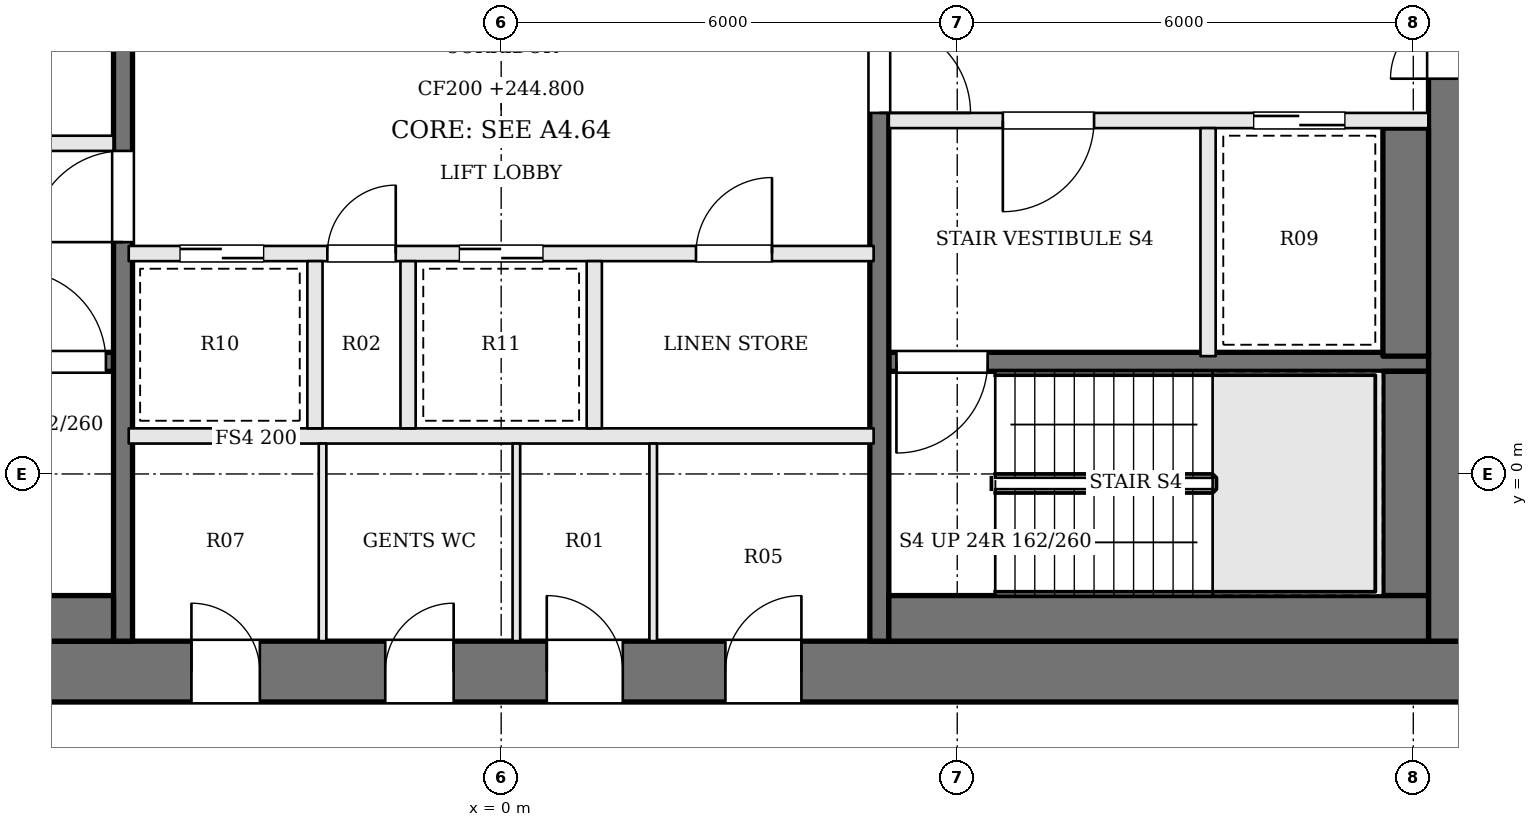
"""IFC4 building model, lengths in metres.
Left out: names, types, materials, properties, quantities, classifications, styles, units other than length and angle.
Written with IfcOpenShell. Run it as: python <this file> out.ifc"""

import sys

from ifc_helpers import new_model, si_unit, direction, frame, frame_2d, origin, place, context, subcontext, project, spatial, rectangle, extrude, element, fill, save


model = new_model("IFC4")
c1 = context("Model", 3, precision=1e-05, world=origin(), true_north=direction((0.0, 1.0)))
c2 = subcontext(c1, "Body", "Model", "MODEL_VIEW")
j1 = project(units=[si_unit("LENGTHUNIT", "METRE"), si_unit("PLANEANGLEUNIT", "RADIAN")], contexts=[c1])
p1 = place(None, origin())
s1 = spatial("IfcSite", under=j1, at=p1, CompositionType="ELEMENT")
p2 = place(p1, origin())
s2 = spatial("IfcBuilding", under=s1, at=p2, CompositionType="ELEMENT")
p3 = place(p2, frame((0.0, 0.0, 244.8)))
s3 = spatial("IfcBuildingStorey", under=s2, at=p3, CompositionType="ELEMENT", Elevation=244.8)
p4 = place(p3, frame((-13.0, -2.6, 0.0), z_axis=(0.0, 0.0, 1.0), x_axis=(1.0, 0.0, 0.0)))
e1 = element("IfcWall", 1, at=p4, inside=s3, PredefinedType="SHEAR", context=c2, shape_type="SweptSolid", body=[
    extrude(rectangle(XDim=26.0, YDim=0.8, at=frame_2d((13.0, 0.0))), origin(), (0.0, 0.0, 1.0), 3.9),
])
p5 = place(p4, frame((8.925, 0.0, 0.0)))
e2 = element("IfcOpeningElement", 2, at=p5, cuts=e1, PredefinedType="OPENING", context=c2, shape_type="SweptSolid", body=[
    extrude(rectangle(XDim=0.9, YDim=2.1, at=frame_2d((0.45, 1.05))), frame((0.0, 0.41, 0.0), z_axis=(0.0, -1.0, 0.0), x_axis=(1.0, 0.0, 0.0)), (0.0, 0.0, 1.0), 0.82),
])
p6 = place(p4, frame((11.475, 0.0, 0.0)))
e3 = element("IfcOpeningElement", 3, at=p6, cuts=e1, PredefinedType="OPENING", context=c2, shape_type="SweptSolid", body=[
    extrude(rectangle(XDim=0.9, YDim=2.1, at=frame_2d((0.45, 1.05))), frame((0.0, 0.41, 0.0), z_axis=(0.0, -1.0, 0.0), x_axis=(1.0, 0.0, 0.0)), (0.0, 0.0, 1.0), 0.82),
])
p7 = place(p4, frame((13.6, 0.0, 0.0)))
e4 = element("IfcOpeningElement", 4, at=p7, cuts=e1, PredefinedType="OPENING", context=c2, shape_type="SweptSolid", body=[
    extrude(rectangle(XDim=1.0, YDim=2.1, at=frame_2d((0.5, 1.05))), frame((0.0, 0.41, 0.0), z_axis=(0.0, -1.0, 0.0), x_axis=(1.0, 0.0, 0.0)), (0.0, 0.0, 1.0), 0.82),
])
p8 = place(p4, frame((15.95, 0.0, 0.0)))
e5 = element("IfcOpeningElement", 5, at=p8, cuts=e1, PredefinedType="OPENING", context=c2, shape_type="SweptSolid", body=[
    extrude(rectangle(XDim=1.0, YDim=2.1, at=frame_2d((0.5, 1.05))), frame((0.0, 0.41, 0.0), z_axis=(0.0, -1.0, 0.0), x_axis=(1.0, 0.0, 0.0)), (0.0, 0.0, 1.0), 0.82),
])
p9 = place(p3, frame((12.6, -2.2, 0.0), z_axis=(0.0, 0.0, 1.0), x_axis=(0.0, 1.0, 0.0)))
e6 = element("IfcWall", 6, at=p9, inside=s3, PredefinedType="SHEAR", context=c2, shape_type="SweptSolid", body=[
    extrude(rectangle(XDim=13.4, YDim=0.8, at=frame_2d((6.7, 0.0))), origin(), (0.0, 0.0, 1.0), 3.9),
])
p10 = place(p9, frame((7.4, 0.0, 0.0)))
e7 = element("IfcOpeningElement", 7, at=p10, cuts=e6, PredefinedType="OPENING", context=c2, shape_type="SweptSolid", body=[
    extrude(rectangle(XDim=1.8, YDim=2.1, at=frame_2d((0.9, 1.05))), frame((0.0, 0.41, 0.0), z_axis=(0.0, -1.0, 0.0), x_axis=(1.0, 0.0, 0.0)), (0.0, 0.0, 1.0), 0.82),
])
p11 = place(p3, frame((-12.2, 1.475, 0.0), z_axis=(0.0, 0.0, 1.0), x_axis=(1.0, 0.0, 0.0)))
e8 = element("IfcWall", 8, at=p11, inside=s3, PredefinedType="SOLIDWALL", context=c2, shape_type="SweptSolid", body=[
    extrude(rectangle(XDim=7.1, YDim=0.25, at=frame_2d((3.55, 0.0))), origin(), (0.0, 0.0, 1.0), 3.7),
])
p12 = place(p11, frame((5.8, 0.0, 0.0)))
e9 = element("IfcOpeningElement", 9, at=p12, cuts=e8, PredefinedType="OPENING", context=c2, shape_type="SweptSolid", body=[
    extrude(rectangle(XDim=1.2, YDim=2.1, at=frame_2d((0.6, 1.05))), frame((0.0, 0.135, 0.0), z_axis=(0.0, -1.0, 0.0), x_axis=(1.0, 0.0, 0.0)), (0.0, 0.0, 1.0), 0.27),
])
p13 = place(p3, frame((-12.2, 4.35, 0.0), z_axis=(0.0, 0.0, 1.0), x_axis=(1.0, 0.0, 0.0)))
e10 = element("IfcWall", 10, at=p13, inside=s3, PredefinedType="SOLIDWALL", context=c2, shape_type="SweptSolid", body=[
    extrude(rectangle(XDim=7.1, YDim=0.2, at=frame_2d((3.55, 0.0))), origin(), (0.0, 0.0, 1.0), 3.7),
])
p14 = place(p13, frame((4.4, 0.0, 0.0)))
e11 = element("IfcOpeningElement", 11, at=p14, cuts=e10, PredefinedType="OPENING", context=c2, shape_type="SweptSolid", body=[
    extrude(rectangle(XDim=1.2, YDim=2.1, at=frame_2d((0.6, 1.05))), frame((0.0, 0.11, 0.0), z_axis=(0.0, -1.0, 0.0), x_axis=(1.0, 0.0, 0.0)), (0.0, 0.0, 1.0), 0.22),
])
p15 = place(p13, frame((1.1, 0.0, 0.0)))
e12 = element("IfcOpeningElement", 12, at=p15, cuts=e10, PredefinedType="OPENING", context=c2, shape_type="SweptSolid", body=[
    extrude(rectangle(XDim=1.2, YDim=2.1, at=frame_2d((0.6, 1.05))), frame((0.0, 0.11, 0.0), z_axis=(0.0, -1.0, 0.0), x_axis=(1.0, 0.0, 0.0)), (0.0, 0.0, 1.0), 0.22),
])
p16 = place(p3, frame((12.2, 4.65, 0.0), z_axis=(0.0, 0.0, 1.0), x_axis=(-1.0, 0.0, 0.0)))
e13 = element("IfcWall", 13, at=p16, inside=s3, PredefinedType="SOLIDWALL", context=c2, shape_type="SweptSolid", body=[
    extrude(rectangle(XDim=7.1, YDim=0.2, at=frame_2d((3.55, 0.0))), origin(), (0.0, 0.0, 1.0), 3.7),
])
p17 = place(p16, frame((4.4, 0.0, 0.0)))
e14 = element("IfcOpeningElement", 14, at=p17, cuts=e13, PredefinedType="OPENING", context=c2, shape_type="SweptSolid", body=[
    extrude(rectangle(XDim=1.2, YDim=2.1, at=frame_2d((0.6, 1.05))), frame((0.0, 0.11, 0.0), z_axis=(0.0, -1.0, 0.0), x_axis=(1.0, 0.0, 0.0)), (0.0, 0.0, 1.0), 0.22),
])
p18 = place(p16, frame((1.1, 0.0, 0.0)))
e15 = element("IfcOpeningElement", 15, at=p18, cuts=e13, PredefinedType="OPENING", context=c2, shape_type="SweptSolid", body=[
    extrude(rectangle(XDim=1.2, YDim=2.1, at=frame_2d((0.6, 1.05))), frame((0.0, 0.11, 0.0), z_axis=(0.0, -1.0, 0.0), x_axis=(1.0, 0.0, 0.0)), (0.0, 0.0, 1.0), 0.22),
])
p19 = place(p3, frame((12.2, 1.475, 0.0), z_axis=(0.0, 0.0, 1.0), x_axis=(-1.0, 0.0, 0.0)))
e16 = element("IfcWall", 16, at=p19, inside=s3, PredefinedType="SOLIDWALL", context=c2, shape_type="SweptSolid", body=[
    extrude(rectangle(XDim=7.1, YDim=0.25, at=frame_2d((3.55, 0.0))), origin(), (0.0, 0.0, 1.0), 3.7),
])
p20 = place(p19, frame((5.8, 0.0, 0.0)))
e17 = element("IfcOpeningElement", 17, at=p20, cuts=e16, PredefinedType="OPENING", context=c2, shape_type="SweptSolid", body=[
    extrude(rectangle(XDim=1.2, YDim=2.1, at=frame_2d((0.6, 1.05))), frame((0.0, 0.135, 0.0), z_axis=(0.0, -1.0, 0.0), x_axis=(1.0, 0.0, 0.0)), (0.0, 0.0, 1.0), 0.27),
])
p21 = place(p3, frame((9.3, 4.55, 0.0), z_axis=(0.0, 0.0, 1.0), x_axis=(0.0, -1.0, 0.0)))
e18 = element("IfcWall", 18, at=p21, inside=s3, PredefinedType="SOLIDWALL", context=c2, shape_type="SweptSolid", body=[
    extrude(rectangle(XDim=3.0, YDim=0.2, at=frame_2d((1.5, 0.0))), origin(), (0.0, 0.0, 1.0), 3.7),
])
p22 = place(p3, frame((-4.975, -2.2, 0.0), z_axis=(0.0, 0.0, 1.0), x_axis=(0.0, 1.0, 0.0)))
e19 = element("IfcWall", 19, at=p22, inside=s3, PredefinedType="SOLIDWALL", context=c2, shape_type="SweptSolid", body=[
    extrude(rectangle(XDim=13.4, YDim=0.25, at=frame_2d((6.7, 0.0))), origin(), (0.0, 0.0, 1.0), 3.7),
])
p23 = place(p22, frame((5.25, 0.0, 0.0)))
e20 = element("IfcOpeningElement", 20, at=p23, cuts=e19, PredefinedType="OPENING", context=c2, shape_type="SweptSolid", body=[
    extrude(rectangle(XDim=1.2, YDim=2.1, at=frame_2d((0.6, 1.05))), frame((0.0, 0.135, 0.0), z_axis=(0.0, -1.0, 0.0), x_axis=(1.0, 0.0, 0.0)), (0.0, 0.0, 1.0), 0.27),
])
p24 = place(p3, frame((4.975, 11.2, 0.0), z_axis=(0.0, 0.0, 1.0), x_axis=(0.0, -1.0, 0.0)))
e21 = element("IfcWall", 21, at=p24, inside=s3, PredefinedType="SOLIDWALL", context=c2, shape_type="SweptSolid", body=[
    extrude(rectangle(XDim=13.4, YDim=0.25, at=frame_2d((6.7, 0.0))), origin(), (0.0, 0.0, 1.0), 3.7),
])
p25 = place(p24, frame((5.25, 0.0, 0.0)))
e22 = element("IfcOpeningElement", 22, at=p25, cuts=e21, PredefinedType="OPENING", context=c2, shape_type="SweptSolid", body=[
    extrude(rectangle(XDim=1.2, YDim=2.1, at=frame_2d((0.6, 1.05))), frame((0.0, 0.135, 0.0), z_axis=(0.0, -1.0, 0.0), x_axis=(1.0, 0.0, 0.0)), (0.0, 0.0, 1.0), 0.27),
])
p26 = place(p3, frame((-12.2, -1.9, 0.0), z_axis=(0.0, 0.0, 1.0), x_axis=(1.0, 0.0, 0.0)))
e23 = element("IfcWall", 23, at=p26, inside=s3, PredefinedType="SOLIDWALL", context=c2, shape_type="SweptSolid", body=[
    extrude(rectangle(XDim=7.1, YDim=0.6, at=frame_2d((3.55, 0.0))), origin(), (0.0, 0.0, 1.0), 3.7),
])
p27 = place(p3, frame((11.9, 4.55, 0.0), z_axis=(0.0, 0.0, 1.0), x_axis=(0.0, -1.0, 0.0)))
e24 = element("IfcWall", 24, at=p27, inside=s3, PredefinedType="SOLIDWALL", context=c2, shape_type="SweptSolid", body=[
    extrude(rectangle(XDim=3.0, YDim=0.6, at=frame_2d((1.5, 0.0))), origin(), (0.0, 0.0, 1.0), 3.7),
])
p28 = place(p3, frame((11.9, 1.35, 0.0), z_axis=(0.0, 0.0, 1.0), x_axis=(0.0, -1.0, 0.0)))
e25 = element("IfcWall", 25, at=p28, inside=s3, PredefinedType="SOLIDWALL", context=c2, shape_type="SweptSolid", body=[
    extrude(rectangle(XDim=2.95, YDim=0.6, at=frame_2d((1.475, 0.0))), origin(), (0.0, 0.0, 1.0), 3.7),
])
p29 = place(p3, frame((12.2, -1.9, 0.0), z_axis=(0.0, 0.0, 1.0), x_axis=(-1.0, 0.0, 0.0)))
e26 = element("IfcWall", 26, at=p29, inside=s3, PredefinedType="SOLIDWALL", context=c2, shape_type="SweptSolid", body=[
    extrude(rectangle(XDim=7.1, YDim=0.6, at=frame_2d((3.55, 0.0))), origin(), (0.0, 0.0, 1.0), 3.7),
])
p30 = place(p3, frame((-4.9, 0.5, 0.0), z_axis=(0.0, 0.0, 1.0), x_axis=(1.0, 0.0, 0.0)))
e27 = element("IfcWall", 27, at=p30, inside=s3, PredefinedType="SOLIDWALL", context=c2, shape_type="SweptSolid", body=[
    extrude(rectangle(XDim=9.8, YDim=0.2, at=frame_2d((4.9, 0.0))), origin(), (0.0, 0.0, 1.0), 3.7),
])
p31 = place(p3, frame((-4.9, 2.9, 0.0), z_axis=(0.0, 0.0, 1.0), x_axis=(1.0, 0.0, 0.0)))
e28 = element("IfcWall", 28, at=p31, inside=s3, PredefinedType="SOLIDWALL", context=c2, shape_type="SweptSolid", body=[
    extrude(rectangle(XDim=9.8, YDim=0.2, at=frame_2d((4.9, 0.0))), origin(), (0.0, 0.0, 1.0), 3.7),
])
p32 = place(p31, frame((0.675, 0.0, 0.0)))
e29 = element("IfcOpeningElement", 29, at=p32, cuts=e28, PredefinedType="OPENING", context=c2, shape_type="SweptSolid", body=[
    extrude(rectangle(XDim=1.1, YDim=2.1, at=frame_2d((0.55, 1.05))), frame((0.0, 0.11, 0.0), z_axis=(0.0, -1.0, 0.0), x_axis=(1.0, 0.0, 0.0)), (0.0, 0.0, 1.0), 0.22),
])
p33 = place(p31, frame((2.613, 0.0, 0.0)))
e30 = element("IfcOpeningElement", 30, at=p33, cuts=e28, PredefinedType="OPENING", context=c2, shape_type="SweptSolid", body=[
    extrude(rectangle(XDim=0.9, YDim=2.1, at=frame_2d((0.45, 1.05))), frame((0.0, 0.11, 0.0), z_axis=(0.0, -1.0, 0.0), x_axis=(1.0, 0.0, 0.0)), (0.0, 0.0, 1.0), 0.22),
])
p34 = place(p31, frame((4.35, 0.0, 0.0)))
e31 = element("IfcOpeningElement", 31, at=p34, cuts=e28, PredefinedType="OPENING", context=c2, shape_type="SweptSolid", body=[
    extrude(rectangle(XDim=1.1, YDim=2.1, at=frame_2d((0.55, 1.05))), frame((0.0, 0.11, 0.0), z_axis=(0.0, -1.0, 0.0), x_axis=(1.0, 0.0, 0.0)), (0.0, 0.0, 1.0), 0.22),
])
p35 = place(p31, frame((7.463, 0.0, 0.0)))
e32 = element("IfcOpeningElement", 32, at=p35, cuts=e28, PredefinedType="OPENING", context=c2, shape_type="SweptSolid", body=[
    extrude(rectangle(XDim=1.0, YDim=2.1, at=frame_2d((0.5, 1.05))), frame((0.0, 0.11, 0.0), z_axis=(0.0, -1.0, 0.0), x_axis=(1.0, 0.0, 0.0)), (0.0, 0.0, 1.0), 0.22),
])
for number, where, z_axis, x_axis in (
    (33, (-2.45, 0.6, 0.0), (0.0, 0.0, 1.0), (0.0, 1.0, 0.0)),
    (34, (-1.225, 0.6, 0.0), (0.0, 0.0, 1.0), (0.0, 1.0, 0.0)),
    (35, (1.225, 0.6, 0.0), (0.0, 0.0, 1.0), (0.0, 1.0, 0.0)),
):
    element("IfcWall", number, at=place(p3, frame(where, z_axis=z_axis, x_axis=x_axis)), inside=s3, PredefinedType="SOLIDWALL", context=c2, shape_type="SweptSolid", body=[
        extrude(rectangle(XDim=2.2, YDim=0.2, at=frame_2d((1.1, 0.0))), origin(), (0.0, 0.0, 1.0), 3.7),
    ])
for number, where, z_axis, x_axis in (
    (36, (-2.35, -2.2, 0.0), (0.0, 0.0, 1.0), (0.0, 1.0, 0.0)),
    (37, (0.2, -2.2, 0.0), (0.0, 0.0, 1.0), (0.0, 1.0, 0.0)),
    (38, (2.0, -2.2, 0.0), (0.0, 0.0, 1.0), (0.0, 1.0, 0.0)),
):
    element("IfcWall", number, at=place(p3, frame(where, z_axis=z_axis, x_axis=x_axis)), inside=s3, PredefinedType="PARTITIONING", context=c2, shape_type="SweptSolid", body=[
        extrude(rectangle(XDim=2.6, YDim=0.1, at=frame_2d((1.3, 0.0))), origin(), (0.0, 0.0, 1.0), 3.7),
    ])
p36 = place(p10, origin())
e39 = element("IfcDoor", 39, at=p36, inside=s3, OperationType="DOUBLE_DOOR_SINGLE_SWING", PredefinedType="DOOR", context=c2, shape_type="SweptSolid", body=[
    extrude(rectangle(XDim=1.8, YDim=2.1, at=frame_2d((0.9, 1.05))), frame((0.0, 0.025, 0.0), z_axis=(0.0, -1.0, 0.0), x_axis=(1.0, 0.0, 0.0)), (0.0, 0.0, 1.0), 0.05),
])
fill(e7, e39)
p37 = place(p23, origin())
e40 = element("IfcDoor", 40, at=p37, inside=s3, OperationType="SINGLE_SWING_LEFT", PredefinedType="DOOR", context=c2, shape_type="SweptSolid", body=[
    extrude(rectangle(XDim=1.2, YDim=2.1, at=frame_2d((0.6, 1.05))), frame((0.0, 0.025, 0.0), z_axis=(0.0, -1.0, 0.0), x_axis=(1.0, 0.0, 0.0)), (0.0, 0.0, 1.0), 0.05),
])
fill(e20, e40)
p38 = place(p25, origin())
e41 = element("IfcDoor", 41, at=p38, inside=s3, OperationType="SINGLE_SWING_RIGHT", PredefinedType="DOOR", context=c2, shape_type="SweptSolid", body=[
    extrude(rectangle(XDim=1.2, YDim=2.1, at=frame_2d((0.6, 1.05))), frame((0.0, 0.025, 0.0), z_axis=(0.0, -1.0, 0.0), x_axis=(1.0, 0.0, 0.0)), (0.0, 0.0, 1.0), 0.05),
])
fill(e22, e41)
p39 = place(p17, origin())
e42 = element("IfcDoor", 42, at=p39, inside=s3, OperationType="SINGLE_SWING_RIGHT", PredefinedType="DOOR", context=c2, shape_type="SweptSolid", body=[
    extrude(rectangle(XDim=1.2, YDim=2.1, at=frame_2d((0.6, 1.05))), frame((0.0, 0.025, 0.0), z_axis=(0.0, -1.0, 0.0), x_axis=(1.0, 0.0, 0.0)), (0.0, 0.0, 1.0), 0.05),
])
fill(e14, e42)
p40 = place(p12, origin())
e43 = element("IfcDoor", 43, at=p40, inside=s3, OperationType="SINGLE_SWING_LEFT", PredefinedType="DOOR", context=c2, shape_type="SweptSolid", body=[
    extrude(rectangle(XDim=1.2, YDim=2.1, at=frame_2d((0.6, 1.05))), frame((0.0, 0.025, 0.0), z_axis=(0.0, -1.0, 0.0), x_axis=(1.0, 0.0, 0.0)), (0.0, 0.0, 1.0), 0.05),
])
fill(e9, e43)
p41 = place(p20, origin())
e44 = element("IfcDoor", 44, at=p41, inside=s3, OperationType="SINGLE_SWING_RIGHT", PredefinedType="DOOR", context=c2, shape_type="SweptSolid", body=[
    extrude(rectangle(XDim=1.2, YDim=2.1, at=frame_2d((0.6, 1.05))), frame((0.0, 0.025, 0.0), z_axis=(0.0, -1.0, 0.0), x_axis=(1.0, 0.0, 0.0)), (0.0, 0.0, 1.0), 0.05),
])
fill(e17, e44)
p42 = place(p18, origin())
e45 = element("IfcDoor", 45, at=p42, inside=s3, OperationType="SLIDING_TO_RIGHT", PredefinedType="DOOR", context=c2, shape_type="SweptSolid", body=[
    extrude(rectangle(XDim=1.2, YDim=2.1, at=frame_2d((0.6, 1.05))), frame((0.0, 0.025, 0.0), z_axis=(0.0, -1.0, 0.0), x_axis=(1.0, 0.0, 0.0)), (0.0, 0.0, 1.0), 0.05),
])
fill(e15, e45)
p43 = place(p32, origin())
e46 = element("IfcDoor", 46, at=p43, inside=s3, OperationType="SLIDING_TO_RIGHT", PredefinedType="DOOR", context=c2, shape_type="SweptSolid", body=[
    extrude(rectangle(XDim=1.1, YDim=2.1, at=frame_2d((0.55, 1.05))), frame((0.0, 0.025, 0.0), z_axis=(0.0, -1.0, 0.0), x_axis=(1.0, 0.0, 0.0)), (0.0, 0.0, 1.0), 0.05),
])
fill(e29, e46)
p44 = place(p33, origin())
e47 = element("IfcDoor", 47, at=p44, inside=s3, OperationType="SINGLE_SWING_RIGHT", PredefinedType="DOOR", context=c2, shape_type="SweptSolid", body=[
    extrude(rectangle(XDim=0.9, YDim=2.1, at=frame_2d((0.45, 1.05))), frame((0.0, 0.025, 0.0), z_axis=(0.0, -1.0, 0.0), x_axis=(1.0, 0.0, 0.0)), (0.0, 0.0, 1.0), 0.05),
])
fill(e30, e47)
p45 = place(p34, origin())
e48 = element("IfcDoor", 48, at=p45, inside=s3, OperationType="SLIDING_TO_LEFT", PredefinedType="DOOR", context=c2, shape_type="SweptSolid", body=[
    extrude(rectangle(XDim=1.1, YDim=2.1, at=frame_2d((0.55, 1.05))), frame((0.0, 0.025, 0.0), z_axis=(0.0, -1.0, 0.0), x_axis=(1.0, 0.0, 0.0)), (0.0, 0.0, 1.0), 0.05),
])
fill(e31, e48)
p46 = place(p35, origin())
e49 = element("IfcDoor", 49, at=p46, inside=s3, OperationType="SINGLE_SWING_RIGHT", PredefinedType="DOOR", context=c2, shape_type="SweptSolid", body=[
    extrude(rectangle(XDim=1.0, YDim=2.1, at=frame_2d((0.5, 1.05))), frame((0.0, 0.025, 0.0), z_axis=(0.0, -1.0, 0.0), x_axis=(1.0, 0.0, 0.0)), (0.0, 0.0, 1.0), 0.05),
])
fill(e32, e49)
p47 = place(p5, origin())
e50 = element("IfcDoor", 50, at=p47, inside=s3, OperationType="SINGLE_SWING_LEFT", PredefinedType="DOOR", context=c2, shape_type="SweptSolid", body=[
    extrude(rectangle(XDim=0.9, YDim=2.1, at=frame_2d((0.45, 1.05))), frame((0.0, 0.025, 0.0), z_axis=(0.0, -1.0, 0.0), x_axis=(1.0, 0.0, 0.0)), (0.0, 0.0, 1.0), 0.05),
])
fill(e2, e50)
p48 = place(p6, origin())
e51 = element("IfcDoor", 51, at=p48, inside=s3, OperationType="SINGLE_SWING_RIGHT", PredefinedType="DOOR", context=c2, shape_type="SweptSolid", body=[
    extrude(rectangle(XDim=0.9, YDim=2.1, at=frame_2d((0.45, 1.05))), frame((0.0, 0.025, 0.0), z_axis=(0.0, -1.0, 0.0), x_axis=(1.0, 0.0, 0.0)), (0.0, 0.0, 1.0), 0.05),
])
fill(e3, e51)
p49 = place(p7, origin())
e52 = element("IfcDoor", 52, at=p49, inside=s3, OperationType="SINGLE_SWING_LEFT", PredefinedType="DOOR", context=c2, shape_type="SweptSolid", body=[
    extrude(rectangle(XDim=1.0, YDim=2.1, at=frame_2d((0.5, 1.05))), frame((0.0, 0.025, 0.0), z_axis=(0.0, -1.0, 0.0), x_axis=(1.0, 0.0, 0.0)), (0.0, 0.0, 1.0), 0.05),
])
fill(e4, e52)
p50 = place(p8, origin())
e53 = element("IfcDoor", 53, at=p50, inside=s3, OperationType="SINGLE_SWING_RIGHT", PredefinedType="DOOR", context=c2, shape_type="SweptSolid", body=[
    extrude(rectangle(XDim=1.0, YDim=2.1, at=frame_2d((0.5, 1.05))), frame((0.0, 0.025, 0.0), z_axis=(0.0, -1.0, 0.0), x_axis=(1.0, 0.0, 0.0)), (0.0, 0.0, 1.0), 0.05),
])
fill(e5, e53)
save(model, sys.argv[1])
